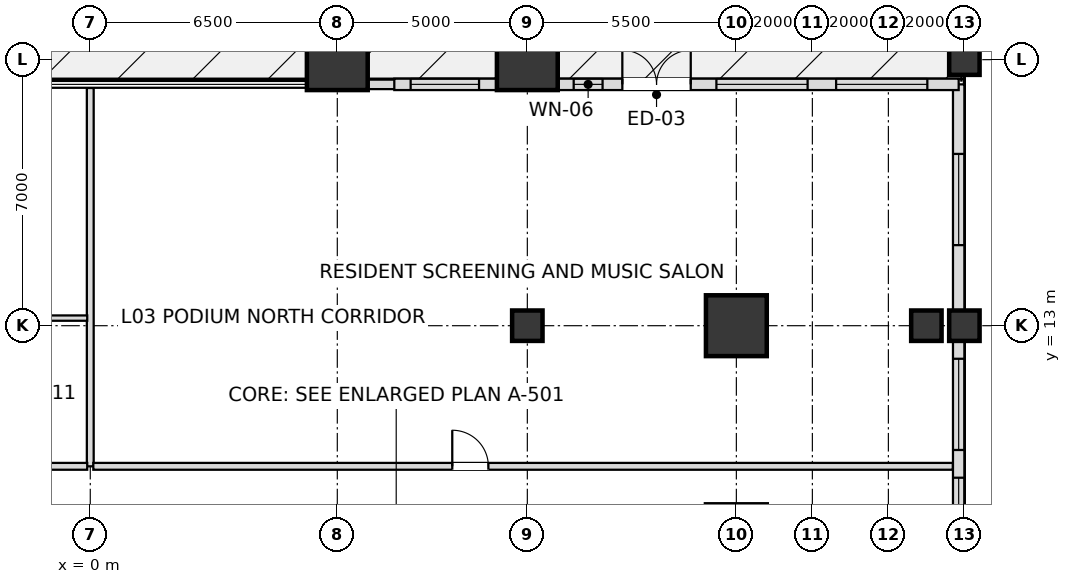
"""IFC4 building model, lengths in metres.
Left out: names, types, materials, properties, quantities, classifications, styles, units other than length and angle.
Written with IfcOpenShell. Run it as: python <this file> out.ifc"""

import sys

from ifc_helpers import new_model, si_unit, direction, frame, frame_2d, origin, origin_2d, place, context, subcontext, project, spatial, rectangle, extrude, element, fill, save


model = new_model("IFC4")
c1 = context("Model", 3, precision=1e-05, world=origin(), true_north=direction((0.0, 1.0)))
c2 = subcontext(c1, "Body", "Model", "MODEL_VIEW")
j1 = project(units=[si_unit("LENGTHUNIT", "METRE"), si_unit("PLANEANGLEUNIT", "RADIAN")], contexts=[c1])
p1 = place(None, origin())
s1 = spatial("IfcSite", under=j1, at=p1, CompositionType="ELEMENT")
p2 = place(p1, origin())
s2 = spatial("IfcBuilding", under=s1, at=p2, CompositionType="ELEMENT")
p3 = place(p2, frame((0.0, 0.0, 16.8)))
s3 = spatial("IfcBuildingStorey", under=s2, at=p3, CompositionType="ELEMENT", Elevation=16.8)
for number, where, z_axis, x_axis in (
    (1, (17.0, 13.0, 0.0), (0.0, 0.0, 1.0), (1.0, 0.0, 0.0)),
    (2, (11.5, 20.0, 0.0), (0.0, 0.0, 1.0), (1.0, 0.0, 0.0)),
    (3, (6.5, 20.0, 0.0), (0.0, 0.0, 1.0), (1.0, 0.0, 0.0)),
):
    element("IfcColumn", number, at=place(p3, frame(where, z_axis=z_axis, x_axis=x_axis)), inside=s3, PredefinedType="USERDEFINED", context=c2, shape_type="SweptSolid", body=[
        extrude(rectangle(XDim=1.6, YDim=1.6, at=origin_2d()), origin(), (0.0, 0.0, 1.0), 5.4),
    ])
for number, where, z_axis, x_axis in (
    (4, (23.0, 13.0, 0.0), (0.0, 0.0, 1.0), (1.0, 0.0, 0.0)),
    (5, (23.0, 20.0, 0.0), (0.0, 0.0, 1.0), (1.0, 0.0, 0.0)),
    (6, (11.5, 13.0, 0.0), (0.0, 0.0, 1.0), (1.0, 0.0, 0.0)),
    (7, (22.0, 13.0, 0.0), (0.0, 0.0, 1.0), (1.0, 0.0, 0.0)),
):
    element("IfcColumn", number, at=place(p3, frame(where, z_axis=z_axis, x_axis=x_axis)), inside=s3, PredefinedType="COLUMN", context=c2, shape_type="SweptSolid", body=[
        extrude(rectangle(XDim=0.8, YDim=0.8, at=origin_2d()), origin(), (0.0, 0.0, 1.0), 5.4),
    ])
p4 = place(p3, frame((22.85, -19.35, 0.0), z_axis=(0.0, 0.0, 1.0), x_axis=(0.0, 1.0, 0.0)))
e8 = element("IfcWall", 8, at=p4, inside=s3, PredefinedType="SOLIDWALL", context=c2, shape_type="SweptSolid", body=[
    extrude(rectangle(XDim=38.7, YDim=0.3, at=frame_2d((19.35, 0.0))), origin(), (0.0, 0.0, 1.0), 4.476),
])
p5 = place(p4, frame((1.83, 0.0, 0.8)))
e9 = element("IfcOpeningElement", 9, at=p5, cuts=e8, PredefinedType="OPENING", context=c2, shape_type="SweptSolid", body=[
    extrude(rectangle(XDim=2.4, YDim=2.2, at=frame_2d((1.2, 1.1))), frame((0.0, 0.16, 0.0), z_axis=(0.0, -1.0, 0.0), x_axis=(1.0, 0.0, 0.0)), (0.0, 0.0, 1.0), 0.32),
])
p6 = place(p4, frame((7.22, 0.0, 0.8)))
e10 = element("IfcOpeningElement", 10, at=p6, cuts=e8, PredefinedType="OPENING", context=c2, shape_type="SweptSolid", body=[
    extrude(rectangle(XDim=2.4, YDim=2.2, at=frame_2d((1.2, 1.1))), frame((0.0, 0.16, 0.0), z_axis=(0.0, -1.0, 0.0), x_axis=(1.0, 0.0, 0.0)), (0.0, 0.0, 1.0), 0.32),
])
p7 = place(p4, frame((10.35, 0.0, 0.72)))
e11 = element("IfcOpeningElement", 11, at=p7, cuts=e8, PredefinedType="OPENING", context=c2, shape_type="SweptSolid", body=[
    extrude(rectangle(XDim=1.2, YDim=1.68, at=frame_2d((0.6, 0.84))), frame((0.0, 0.16, 0.0), z_axis=(0.0, -1.0, 0.0), x_axis=(1.0, 0.0, 0.0)), (0.0, 0.0, 1.0), 0.32),
])
p8 = place(p4, frame((13.405, 0.0, 0.8)))
e12 = element("IfcOpeningElement", 12, at=p8, cuts=e8, PredefinedType="OPENING", context=c2, shape_type="SweptSolid", body=[
    extrude(rectangle(XDim=2.4, YDim=2.2, at=frame_2d((1.2, 1.1))), frame((0.0, 0.16, 0.0), z_axis=(0.0, -1.0, 0.0), x_axis=(1.0, 0.0, 0.0)), (0.0, 0.0, 1.0), 0.32),
])
p9 = place(p4, frame((18.595, 0.0, 0.8)))
e13 = element("IfcOpeningElement", 13, at=p9, cuts=e8, PredefinedType="OPENING", context=c2, shape_type="SweptSolid", body=[
    extrude(rectangle(XDim=2.4, YDim=2.2, at=frame_2d((1.2, 1.1))), frame((0.0, 0.16, 0.0), z_axis=(0.0, -1.0, 0.0), x_axis=(1.0, 0.0, 0.0)), (0.0, 0.0, 1.0), 0.32),
])
p10 = place(p4, frame((23.5, 0.0, 0.8)))
e14 = element("IfcOpeningElement", 14, at=p10, cuts=e8, PredefinedType="OPENING", context=c2, shape_type="SweptSolid", body=[
    extrude(rectangle(XDim=2.4, YDim=2.2, at=frame_2d((1.2, 1.1))), frame((0.0, 0.16, 0.0), z_axis=(0.0, -1.0, 0.0), x_axis=(1.0, 0.0, 0.0)), (0.0, 0.0, 1.0), 0.32),
])
p11 = place(p4, frame((27.15, 0.0, 0.72)))
e15 = element("IfcOpeningElement", 15, at=p11, cuts=e8, PredefinedType="OPENING", context=c2, shape_type="SweptSolid", body=[
    extrude(rectangle(XDim=1.2, YDim=1.68, at=frame_2d((0.6, 0.84))), frame((0.0, 0.16, 0.0), z_axis=(0.0, -1.0, 0.0), x_axis=(1.0, 0.0, 0.0)), (0.0, 0.0, 1.0), 0.32),
])
p12 = place(p4, frame((29.08, 0.0, 0.8)))
e16 = element("IfcOpeningElement", 16, at=p12, cuts=e8, PredefinedType="OPENING", context=c2, shape_type="SweptSolid", body=[
    extrude(rectangle(XDim=2.4, YDim=2.2, at=frame_2d((1.2, 1.1))), frame((0.0, 0.16, 0.0), z_axis=(0.0, -1.0, 0.0), x_axis=(1.0, 0.0, 0.0)), (0.0, 0.0, 1.0), 0.32),
])
p13 = place(p4, frame((34.47, 0.0, 0.8)))
e17 = element("IfcOpeningElement", 17, at=p13, cuts=e8, PredefinedType="OPENING", context=c2, shape_type="SweptSolid", body=[
    extrude(rectangle(XDim=2.4, YDim=2.2, at=frame_2d((1.2, 1.1))), frame((0.0, 0.16, 0.0), z_axis=(0.0, -1.0, 0.0), x_axis=(1.0, 0.0, 0.0)), (0.0, 0.0, 1.0), 0.32),
])
p14 = place(p3, frame((8.025, 19.35, 0.0), z_axis=(0.0, 0.0, 1.0), x_axis=(-1.0, 0.0, 0.0)))
e18 = element("IfcWall", 18, at=p14, inside=s3, PredefinedType="SOLIDWALL", context=c2, shape_type="SweptSolid", body=[
    extrude(rectangle(XDim=0.73, YDim=0.25, at=frame_2d((0.365, 0.0))), origin(), (0.0, 0.0, 1.0), 5.12),
])
p15 = place(p3, frame((8.0, 19.35, 0.0), z_axis=(0.0, 0.0, 1.0), x_axis=(1.0, 0.0, 0.0)))
e19 = element("IfcWall", 19, at=p15, inside=s3, PredefinedType="SOLIDWALL", context=c2, shape_type="SweptSolid", body=[
    extrude(rectangle(XDim=14.85, YDim=0.3, at=frame_2d((7.425, 0.0))), origin(), (0.0, 0.0, 1.0), 5.12),
])
p16 = place(p15, frame((6.0, 0.0, 0.0)))
e20 = element("IfcOpeningElement", 20, at=p16, cuts=e19, PredefinedType="OPENING", context=c2, shape_type="SweptSolid", body=[
    extrude(rectangle(XDim=1.8, YDim=2.3, at=frame_2d((0.9, 1.15))), frame((0.0, 0.16, 0.0), z_axis=(0.0, -1.0, 0.0), x_axis=(1.0, 0.0, 0.0)), (0.0, 0.0, 1.0), 0.32),
])
p17 = place(p15, frame((0.43, 0.0, 0.72)))
e21 = element("IfcOpeningElement", 21, at=p17, cuts=e19, PredefinedType="OPENING", context=c2, shape_type="SweptSolid", body=[
    extrude(rectangle(XDim=1.8, YDim=1.68, at=frame_2d((0.9, 0.84))), frame((0.0, 0.16, 0.0), z_axis=(0.0, -1.0, 0.0), x_axis=(1.0, 0.0, 0.0)), (0.0, 0.0, 1.0), 0.32),
])
p18 = place(p15, frame((4.72, 0.0, 0.72)))
e22 = element("IfcOpeningElement", 22, at=p18, cuts=e19, PredefinedType="OPENING", context=c2, shape_type="SweptSolid", body=[
    extrude(rectangle(XDim=0.76, YDim=1.68, at=frame_2d((0.38, 0.84))), frame((0.0, 0.16, 0.0), z_axis=(0.0, -1.0, 0.0), x_axis=(1.0, 0.0, 0.0)), (0.0, 0.0, 1.0), 0.32),
])
p19 = place(p15, frame((8.475, 0.0, 0.8)))
e23 = element("IfcOpeningElement", 23, at=p19, cuts=e19, PredefinedType="OPENING", context=c2, shape_type="SweptSolid", body=[
    extrude(rectangle(XDim=2.4, YDim=2.2, at=frame_2d((1.2, 1.1))), frame((0.0, 0.16, 0.0), z_axis=(0.0, -1.0, 0.0), x_axis=(1.0, 0.0, 0.0)), (0.0, 0.0, 1.0), 0.32),
])
p20 = place(p15, frame((11.625, 0.0, 0.8)))
e24 = element("IfcOpeningElement", 24, at=p20, cuts=e19, PredefinedType="OPENING", context=c2, shape_type="SweptSolid", body=[
    extrude(rectangle(XDim=2.4, YDim=2.2, at=frame_2d((1.2, 1.1))), frame((0.0, 0.16, 0.0), z_axis=(0.0, -1.0, 0.0), x_axis=(1.0, 0.0, 0.0)), (0.0, 0.0, 1.0), 0.32),
])
p21 = place(p3, frame((0.0, 9.3, 0.0), z_axis=(0.0, 0.0, 1.0), x_axis=(0.0, 1.0, 0.0)))
e25 = element("IfcWall", 25, at=p21, inside=s3, PredefinedType="PARTITIONING", context=c2, shape_type="SweptSolid", body=[
    extrude(rectangle(XDim=9.955, YDim=0.18, at=frame_2d((4.978, 0.0))), origin(), (0.0, 0.0, 1.0), 4.642),
])
p22 = place(p3, frame((-1.87, 9.3, 0.0), z_axis=(0.0, 0.0, 1.0), x_axis=(1.0, 0.0, 0.0)))
e26 = element("IfcWall", 26, at=p22, inside=s3, PredefinedType="PARTITIONING", context=c2, shape_type="SweptSolid", body=[
    extrude(rectangle(XDim=1.79, YDim=0.18, at=frame_2d((0.895, 0.0))), origin(), (0.0, 0.0, 1.0), 5.12),
])
p23 = place(p3, frame((0.08, 9.3, 0.0), z_axis=(0.0, 0.0, 1.0), x_axis=(1.0, 0.0, 0.0)))
e27 = element("IfcWall", 27, at=p23, inside=s3, PredefinedType="PARTITIONING", context=c2, shape_type="SweptSolid", body=[
    extrude(rectangle(XDim=22.615, YDim=0.18, at=frame_2d((11.308, 0.0))), origin(), (0.0, 0.0, 1.0), 4.41),
])
p24 = place(p23, frame((9.445, 0.0, 0.0)))
e28 = element("IfcOpeningElement", 28, at=p24, cuts=e27, PredefinedType="OPENING", context=c2, shape_type="SweptSolid", body=[
    extrude(rectangle(XDim=0.95, YDim=2.15, at=frame_2d((0.475, 1.075))), frame((0.0, 0.1, 0.0), z_axis=(0.0, -1.0, 0.0), x_axis=(1.0, 0.0, 0.0)), (0.0, 0.0, 1.0), 0.2),
])
p25 = place(p3, frame((-1.87, 13.2, 0.0), z_axis=(0.0, 0.0, 1.0), x_axis=(1.0, 0.0, 0.0)))
e29 = element("IfcWall", 29, at=p25, inside=s3, PredefinedType="PARTITIONING", context=c2, shape_type="SweptSolid", body=[
    extrude(rectangle(XDim=1.79, YDim=0.14, at=frame_2d((0.895, 0.0))), origin(), (0.0, 0.0, 1.0), 5.12),
])
p26 = place(p11, origin())
e30 = element("IfcWindow", 30, at=p26, inside=s3, PartitioningType="SINGLE_PANEL", PredefinedType="WINDOW", context=c2, shape_type="SweptSolid", body=[
    extrude(rectangle(XDim=1.2, YDim=1.68, at=frame_2d((0.6, 0.84))), frame((0.0, 0.03, 0.0), z_axis=(0.0, -1.0, 0.0), x_axis=(1.0, 0.0, 0.0)), (0.0, 0.0, 1.0), 0.06),
])
fill(e15, e30)
p27 = place(p12, origin())
e31 = element("IfcWindow", 31, at=p27, inside=s3, PartitioningType="SINGLE_PANEL", PredefinedType="WINDOW", context=c2, shape_type="SweptSolid", body=[
    extrude(rectangle(XDim=2.4, YDim=2.2, at=frame_2d((1.2, 1.1))), frame((0.0, 0.03, 0.0), z_axis=(0.0, -1.0, 0.0), x_axis=(1.0, 0.0, 0.0)), (0.0, 0.0, 1.0), 0.06),
])
fill(e16, e31)
p28 = place(p13, origin())
e32 = element("IfcWindow", 32, at=p28, inside=s3, PartitioningType="SINGLE_PANEL", PredefinedType="WINDOW", context=c2, shape_type="SweptSolid", body=[
    extrude(rectangle(XDim=2.4, YDim=2.2, at=frame_2d((1.2, 1.1))), frame((0.0, 0.03, 0.0), z_axis=(0.0, -1.0, 0.0), x_axis=(1.0, 0.0, 0.0)), (0.0, 0.0, 1.0), 0.06),
])
fill(e17, e32)
p29 = place(p16, origin())
e33 = element("IfcDoor", 33, at=p29, inside=s3, OperationType="DOUBLE_DOOR_SINGLE_SWING", PredefinedType="DOOR", context=c2, shape_type="SweptSolid", body=[
    extrude(rectangle(XDim=1.8, YDim=2.3, at=frame_2d((0.9, 1.15))), frame((0.0, 0.025, 0.0), z_axis=(0.0, -1.0, 0.0), x_axis=(1.0, 0.0, 0.0)), (0.0, 0.0, 1.0), 0.05),
])
fill(e20, e33)
p30 = place(p17, origin())
e34 = element("IfcWindow", 34, at=p30, inside=s3, PartitioningType="SINGLE_PANEL", PredefinedType="WINDOW", context=c2, shape_type="SweptSolid", body=[
    extrude(rectangle(XDim=1.8, YDim=1.68, at=frame_2d((0.9, 0.84))), frame((0.0, 0.03, 0.0), z_axis=(0.0, -1.0, 0.0), x_axis=(1.0, 0.0, 0.0)), (0.0, 0.0, 1.0), 0.06),
])
fill(e21, e34)
p31 = place(p18, origin())
e35 = element("IfcWindow", 35, at=p31, inside=s3, PartitioningType="SINGLE_PANEL", PredefinedType="WINDOW", context=c2, shape_type="SweptSolid", body=[
    extrude(rectangle(XDim=0.76, YDim=1.68, at=frame_2d((0.38, 0.84))), frame((0.0, 0.03, 0.0), z_axis=(0.0, -1.0, 0.0), x_axis=(1.0, 0.0, 0.0)), (0.0, 0.0, 1.0), 0.06),
])
fill(e22, e35)
p32 = place(p19, origin())
e36 = element("IfcWindow", 36, at=p32, inside=s3, PartitioningType="SINGLE_PANEL", PredefinedType="WINDOW", context=c2, shape_type="SweptSolid", body=[
    extrude(rectangle(XDim=2.4, YDim=2.2, at=frame_2d((1.2, 1.1))), frame((0.0, 0.03, 0.0), z_axis=(0.0, -1.0, 0.0), x_axis=(1.0, 0.0, 0.0)), (0.0, 0.0, 1.0), 0.06),
])
fill(e23, e36)
p33 = place(p20, origin())
e37 = element("IfcWindow", 37, at=p33, inside=s3, PartitioningType="SINGLE_PANEL", PredefinedType="WINDOW", context=c2, shape_type="SweptSolid", body=[
    extrude(rectangle(XDim=2.4, YDim=2.2, at=frame_2d((1.2, 1.1))), frame((0.0, 0.03, 0.0), z_axis=(0.0, -1.0, 0.0), x_axis=(1.0, 0.0, 0.0)), (0.0, 0.0, 1.0), 0.06),
])
fill(e24, e37)
p34 = place(p24, origin())
e38 = element("IfcDoor", 38, at=p34, inside=s3, OperationType="SINGLE_SWING_LEFT", PredefinedType="DOOR", context=c2, shape_type="SweptSolid", body=[
    extrude(rectangle(XDim=0.95, YDim=2.15, at=frame_2d((0.475, 1.075))), frame((0.0, 0.025, 0.0), z_axis=(0.0, -1.0, 0.0), x_axis=(1.0, 0.0, 0.0)), (0.0, 0.0, 1.0), 0.05),
])
fill(e28, e38)
save(model, sys.argv[1])
